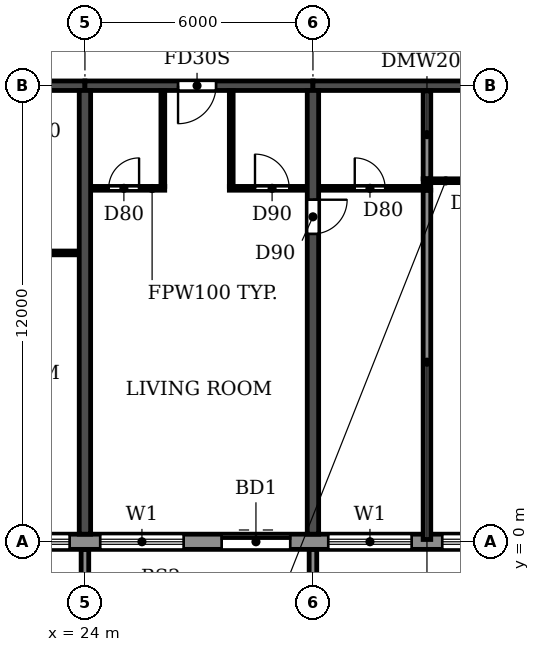
"""IFC4 building model, lengths in metres.
Left out: names, types, materials, properties, quantities, classifications, styles, units other than length and angle.
Written with IfcOpenShell. Run it as: python <this file> out.ifc"""

import sys

from ifc_helpers import new_model, si_unit, direction, frame, frame_2d, origin, place, context, subcontext, project, spatial, polyline, rectangle, outline, extrude, source, transform, mapped, element, fill, save


model = new_model("IFC4")
c1 = context("Model", 3, precision=1e-05, world=origin(), true_north=direction((0.0, 1.0)))
c2 = subcontext(c1, "Body", "Model", "MODEL_VIEW")
j1 = project(units=[si_unit("LENGTHUNIT", "METRE"), si_unit("PLANEANGLEUNIT", "RADIAN")], contexts=[c1])
p1 = place(None, origin())
s1 = spatial("IfcSite", under=j1, at=p1, CompositionType="ELEMENT")
p2 = place(p1, origin())
s2 = spatial("IfcBuilding", under=s1, at=p2, CompositionType="ELEMENT")
p3 = place(p2, frame((0.0, 0.0, 132.3)))
s3 = spatial("IfcBuildingStorey", under=s2, at=p3, CompositionType="ELEMENT", Elevation=132.3)
p4 = place(p3, frame((24.0, 0.2, 0.0), z_axis=(0.0, 0.0, 1.0), x_axis=(0.0, 1.0, 0.0)))
e1 = element("IfcWall", 1, at=p4, inside=s3, PredefinedType="SHEAR", context=c2, shape_type="SweptSolid", body=[
    extrude(rectangle(XDim=11.675, YDim=0.3, at=frame_2d((5.837, 0.0))), origin(), (0.0, 0.0, 1.0), 3.07),
])
p5 = place(p3, frame((30.0, 0.2, 0.0), z_axis=(0.0, 0.0, 1.0), x_axis=(0.0, 1.0, 0.0)))
e2 = element("IfcWall", 2, at=p5, inside=s3, PredefinedType="SHEAR", context=c2, shape_type="SweptSolid", body=[
    extrude(rectangle(XDim=11.675, YDim=0.3, at=frame_2d((5.837, 0.0))), origin(), (0.0, 0.0, 1.0), 3.07),
])
p6 = place(p5, frame((7.9, 0.0, 0.0)))
e3 = element("IfcOpeningElement", 3, at=p6, cuts=e2, PredefinedType="OPENING", context=c2, shape_type="SweptSolid", body=[
    extrude(rectangle(XDim=0.9, YDim=2.1, at=frame_2d((0.45, 1.05))), frame((0.0, 0.16, 0.0), z_axis=(0.0, -1.0, 0.0), x_axis=(1.0, 0.0, 0.0)), (0.0, 0.0, 1.0), 0.32),
])
p7 = place(p3, frame((18.0, 12.0, 0.0), z_axis=(0.0, 0.0, 1.0), x_axis=(1.0, 0.0, 0.0)))
e4 = element("IfcWall", 4, at=p7, inside=s3, PredefinedType="SHEAR", context=c2, shape_type="SweptSolid", body=[
    extrude(rectangle(XDim=6.0, YDim=0.25, at=frame_2d((3.0, 0.0))), origin(), (0.0, 0.0, 1.0), 2.47),
])
p8 = place(p7, frame((2.45, 0.0, 0.0)))
e5 = element("IfcOpeningElement", 5, at=p8, cuts=e4, PredefinedType="OPENING", context=c2, shape_type="SweptSolid", body=[
    extrude(rectangle(XDim=1.0, YDim=2.1, at=frame_2d((0.5, 1.05))), frame((0.0, 0.135, 0.0), z_axis=(0.0, -1.0, 0.0), x_axis=(1.0, 0.0, 0.0)), (0.0, 0.0, 1.0), 0.27),
])
p9 = place(p3, frame((24.0, 12.0, 0.0), z_axis=(0.0, 0.0, 1.0), x_axis=(1.0, 0.0, 0.0)))
e6 = element("IfcWall", 6, at=p9, inside=s3, PredefinedType="SHEAR", context=c2, shape_type="SweptSolid", body=[
    extrude(rectangle(XDim=6.0, YDim=0.25, at=frame_2d((3.0, 0.0))), origin(), (0.0, 0.0, 1.0), 2.47),
])
p10 = place(p9, frame((2.45, 0.0, 0.0)))
e7 = element("IfcOpeningElement", 7, at=p10, cuts=e6, PredefinedType="OPENING", context=c2, shape_type="SweptSolid", body=[
    extrude(rectangle(XDim=1.0, YDim=2.1, at=frame_2d((0.5, 1.05))), frame((0.0, 0.135, 0.0), z_axis=(0.0, -1.0, 0.0), x_axis=(1.0, 0.0, 0.0)), (0.0, 0.0, 1.0), 0.27),
])
p11 = place(p3, frame((30.0, 12.0, 0.0), z_axis=(0.0, 0.0, 1.0), x_axis=(1.0, 0.0, 0.0)))
e8 = element("IfcWall", 8, at=p11, inside=s3, PredefinedType="SHEAR", context=c2, shape_type="SweptSolid", body=[
    extrude(rectangle(XDim=6.0, YDim=0.25, at=frame_2d((3.0, 0.0))), origin(), (0.0, 0.0, 1.0), 2.47),
])
p12 = place(p3, frame((16.683, 0.0, 0.0), z_axis=(0.0, 0.0, 1.0), x_axis=(1.0, 0.0, 0.0)))
e9 = element("IfcWall", 9, at=p12, inside=s3, PredefinedType="STANDARD", context=c2, shape_type="SweptSolid", body=[
    extrude(rectangle(XDim=68.634, YDim=0.4, at=frame_2d((34.317, 0.0))), origin(), (0.0, 0.0, 1.0), 3.07),
])
p13 = place(p12, frame((1.717, 0.0, 0.9)))
e10 = element("IfcOpeningElement", 10, at=p13, cuts=e9, PredefinedType="OPENING", context=c2, shape_type="SweptSolid", body=[
    extrude(rectangle(XDim=2.2, YDim=1.5, at=frame_2d((1.1, 0.75))), frame((0.0, 0.21, 0.0), z_axis=(0.0, -1.0, 0.0), x_axis=(1.0, 0.0, 0.0)), (0.0, 0.0, 1.0), 0.42),
])
p14 = place(p12, frame((4.717, 0.0, 0.9)))
e11 = element("IfcOpeningElement", 11, at=p14, cuts=e9, PredefinedType="OPENING", context=c2, shape_type="SweptSolid", body=[
    extrude(rectangle(XDim=2.2, YDim=1.5, at=frame_2d((1.1, 0.75))), frame((0.0, 0.21, 0.0), z_axis=(0.0, -1.0, 0.0), x_axis=(1.0, 0.0, 0.0)), (0.0, 0.0, 1.0), 0.42),
])
p15 = place(p12, frame((7.717, 0.0, 0.9)))
e12 = element("IfcOpeningElement", 12, at=p15, cuts=e9, PredefinedType="OPENING", context=c2, shape_type="SweptSolid", body=[
    extrude(rectangle(XDim=2.2, YDim=1.5, at=frame_2d((1.1, 0.75))), frame((0.0, 0.21, 0.0), z_axis=(0.0, -1.0, 0.0), x_axis=(1.0, 0.0, 0.0)), (0.0, 0.0, 1.0), 0.42),
])
p16 = place(p12, frame((10.917, 0.0, 0.0)))
e13 = element("IfcOpeningElement", 13, at=p16, cuts=e9, PredefinedType="OPENING", context=c2, shape_type="SweptSolid", body=[
    extrude(rectangle(XDim=1.8, YDim=2.4, at=frame_2d((0.9, 1.2))), frame((0.0, 0.21, 0.0), z_axis=(0.0, -1.0, 0.0), x_axis=(1.0, 0.0, 0.0)), (0.0, 0.0, 1.0), 0.42),
])
p17 = place(p12, frame((13.717, 0.0, 0.9)))
e14 = element("IfcOpeningElement", 14, at=p17, cuts=e9, PredefinedType="OPENING", context=c2, shape_type="SweptSolid", body=[
    extrude(rectangle(XDim=2.2, YDim=1.5, at=frame_2d((1.1, 0.75))), frame((0.0, 0.21, 0.0), z_axis=(0.0, -1.0, 0.0), x_axis=(1.0, 0.0, 0.0)), (0.0, 0.0, 1.0), 0.42),
])
p18 = place(p12, frame((16.717, 0.0, 0.9)))
e15 = element("IfcOpeningElement", 15, at=p18, cuts=e9, PredefinedType="OPENING", context=c2, shape_type="SweptSolid", body=[
    extrude(rectangle(XDim=2.2, YDim=1.5, at=frame_2d((1.1, 0.75))), frame((0.0, 0.21, 0.0), z_axis=(0.0, -1.0, 0.0), x_axis=(1.0, 0.0, 0.0)), (0.0, 0.0, 1.0), 0.42),
])
p19 = place(p12, frame((19.917, 0.0, 0.0)))
e16 = element("IfcOpeningElement", 16, at=p19, cuts=e9, PredefinedType="OPENING", context=c2, shape_type="SweptSolid", body=[
    extrude(rectangle(XDim=1.8, YDim=2.4, at=frame_2d((0.9, 1.2))), frame((0.0, 0.21, 0.0), z_axis=(0.0, -1.0, 0.0), x_axis=(1.0, 0.0, 0.0)), (0.0, 0.0, 1.0), 0.42),
])
p20 = place(p12, frame((22.717, 0.0, 0.9)))
e17 = element("IfcOpeningElement", 17, at=p20, cuts=e9, PredefinedType="OPENING", context=c2, shape_type="SweptSolid", body=[
    extrude(rectangle(XDim=2.2, YDim=1.5, at=frame_2d((1.1, 0.75))), frame((0.0, 0.21, 0.0), z_axis=(0.0, -1.0, 0.0), x_axis=(1.0, 0.0, 0.0)), (0.0, 0.0, 1.0), 0.42),
])
p21 = place(p12, frame((25.717, 0.0, 0.9)))
e18 = element("IfcOpeningElement", 18, at=p21, cuts=e9, PredefinedType="OPENING", context=c2, shape_type="SweptSolid", body=[
    extrude(rectangle(XDim=2.2, YDim=1.5, at=frame_2d((1.1, 0.75))), frame((0.0, 0.21, 0.0), z_axis=(0.0, -1.0, 0.0), x_axis=(1.0, 0.0, 0.0)), (0.0, 0.0, 1.0), 0.42),
])
p22 = place(p12, frame((28.717, 0.0, 0.9)))
e19 = element("IfcOpeningElement", 19, at=p22, cuts=e9, PredefinedType="OPENING", context=c2, shape_type="SweptSolid", body=[
    extrude(rectangle(XDim=2.2, YDim=1.5, at=frame_2d((1.1, 0.75))), frame((0.0, 0.21, 0.0), z_axis=(0.0, -1.0, 0.0), x_axis=(1.0, 0.0, 0.0)), (0.0, 0.0, 1.0), 0.42),
])
p23 = place(p12, frame((31.917, 0.0, 0.0)))
e20 = element("IfcOpeningElement", 20, at=p23, cuts=e9, PredefinedType="OPENING", context=c2, shape_type="SweptSolid", body=[
    extrude(rectangle(XDim=1.8, YDim=2.4, at=frame_2d((0.9, 1.2))), frame((0.0, 0.21, 0.0), z_axis=(0.0, -1.0, 0.0), x_axis=(1.0, 0.0, 0.0)), (0.0, 0.0, 1.0), 0.42),
])
p24 = place(p12, frame((34.717, 0.0, 0.9)))
e21 = element("IfcOpeningElement", 21, at=p24, cuts=e9, PredefinedType="OPENING", context=c2, shape_type="SweptSolid", body=[
    extrude(rectangle(XDim=2.2, YDim=1.5, at=frame_2d((1.1, 0.75))), frame((0.0, 0.21, 0.0), z_axis=(0.0, -1.0, 0.0), x_axis=(1.0, 0.0, 0.0)), (0.0, 0.0, 1.0), 0.42),
])
p25 = place(p12, frame((37.717, 0.0, 0.9)))
e22 = element("IfcOpeningElement", 22, at=p25, cuts=e9, PredefinedType="OPENING", context=c2, shape_type="SweptSolid", body=[
    extrude(rectangle(XDim=2.2, YDim=1.5, at=frame_2d((1.1, 0.75))), frame((0.0, 0.21, 0.0), z_axis=(0.0, -1.0, 0.0), x_axis=(1.0, 0.0, 0.0)), (0.0, 0.0, 1.0), 0.42),
])
p26 = place(p12, frame((40.717, 0.0, 0.9)))
e23 = element("IfcOpeningElement", 23, at=p26, cuts=e9, PredefinedType="OPENING", context=c2, shape_type="SweptSolid", body=[
    extrude(rectangle(XDim=2.2, YDim=1.5, at=frame_2d((1.1, 0.75))), frame((0.0, 0.21, 0.0), z_axis=(0.0, -1.0, 0.0), x_axis=(1.0, 0.0, 0.0)), (0.0, 0.0, 1.0), 0.42),
])
p27 = place(p12, frame((43.717, 0.0, 0.9)))
e24 = element("IfcOpeningElement", 24, at=p27, cuts=e9, PredefinedType="OPENING", context=c2, shape_type="SweptSolid", body=[
    extrude(rectangle(XDim=2.2, YDim=1.5, at=frame_2d((1.1, 0.75))), frame((0.0, 0.21, 0.0), z_axis=(0.0, -1.0, 0.0), x_axis=(1.0, 0.0, 0.0)), (0.0, 0.0, 1.0), 0.42),
])
p28 = place(p12, frame((46.917, 0.0, 0.0)))
e25 = element("IfcOpeningElement", 25, at=p28, cuts=e9, PredefinedType="OPENING", context=c2, shape_type="SweptSolid", body=[
    extrude(rectangle(XDim=1.8, YDim=2.4, at=frame_2d((0.9, 1.2))), frame((0.0, 0.21, 0.0), z_axis=(0.0, -1.0, 0.0), x_axis=(1.0, 0.0, 0.0)), (0.0, 0.0, 1.0), 0.42),
])
p29 = place(p12, frame((49.717, 0.0, 0.9)))
e26 = element("IfcOpeningElement", 26, at=p29, cuts=e9, PredefinedType="OPENING", context=c2, shape_type="SweptSolid", body=[
    extrude(rectangle(XDim=2.2, YDim=1.5, at=frame_2d((1.1, 0.75))), frame((0.0, 0.21, 0.0), z_axis=(0.0, -1.0, 0.0), x_axis=(1.0, 0.0, 0.0)), (0.0, 0.0, 1.0), 0.42),
])
p30 = place(p12, frame((52.717, 0.0, 0.9)))
e27 = element("IfcOpeningElement", 27, at=p30, cuts=e9, PredefinedType="OPENING", context=c2, shape_type="SweptSolid", body=[
    extrude(rectangle(XDim=2.2, YDim=1.5, at=frame_2d((1.1, 0.75))), frame((0.0, 0.21, 0.0), z_axis=(0.0, -1.0, 0.0), x_axis=(1.0, 0.0, 0.0)), (0.0, 0.0, 1.0), 0.42),
])
p31 = place(p12, frame((55.717, 0.0, 0.9)))
e28 = element("IfcOpeningElement", 28, at=p31, cuts=e9, PredefinedType="OPENING", context=c2, shape_type="SweptSolid", body=[
    extrude(rectangle(XDim=2.2, YDim=1.5, at=frame_2d((1.1, 0.75))), frame((0.0, 0.21, 0.0), z_axis=(0.0, -1.0, 0.0), x_axis=(1.0, 0.0, 0.0)), (0.0, 0.0, 1.0), 0.42),
])
p32 = place(p12, frame((58.917, 0.0, 0.0)))
e29 = element("IfcOpeningElement", 29, at=p32, cuts=e9, PredefinedType="OPENING", context=c2, shape_type="SweptSolid", body=[
    extrude(rectangle(XDim=1.8, YDim=2.4, at=frame_2d((0.9, 1.2))), frame((0.0, 0.21, 0.0), z_axis=(0.0, -1.0, 0.0), x_axis=(1.0, 0.0, 0.0)), (0.0, 0.0, 1.0), 0.42),
])
p33 = place(p12, frame((61.717, 0.0, 0.9)))
e30 = element("IfcOpeningElement", 30, at=p33, cuts=e9, PredefinedType="OPENING", context=c2, shape_type="SweptSolid", body=[
    extrude(rectangle(XDim=2.2, YDim=1.5, at=frame_2d((1.1, 0.75))), frame((0.0, 0.21, 0.0), z_axis=(0.0, -1.0, 0.0), x_axis=(1.0, 0.0, 0.0)), (0.0, 0.0, 1.0), 0.42),
])
p34 = place(p12, frame((64.717, 0.0, 0.9)))
e31 = element("IfcOpeningElement", 31, at=p34, cuts=e9, PredefinedType="OPENING", context=c2, shape_type="SweptSolid", body=[
    extrude(rectangle(XDim=2.2, YDim=1.5, at=frame_2d((1.1, 0.75))), frame((0.0, 0.21, 0.0), z_axis=(0.0, -1.0, 0.0), x_axis=(1.0, 0.0, 0.0)), (0.0, 0.0, 1.0), 0.42),
])
m1 = source(origin(), c2, "Body", "SweptSolid", [
    extrude(outline(polyline([(0.0, 0.0), (0.2, 0.0), (0.2, 1.65), (0.0, 1.65), (0.0, 0.0)])), origin(), (0.0, 0.0, 1.0), 3.1),
])
for number, where in (
    (32, (23.9, -1.85, 0.0)),
    (33, (29.9, -1.85, 0.0)),
):
    element("IfcWall", number, at=place(p3, frame(where)), inside=s3, PredefinedType="STANDARD", context=c2, shape_type="MappedRepresentation", body=[
        mapped(m1, transform((0.0, 0.0, 0.0))),
    ])
p35 = place(p3, frame((33.0, 0.06, 0.0), z_axis=(0.0, 0.0, 1.0), x_axis=(0.0, 1.0, 0.0)))
e34 = element("IfcWall", 34, at=p35, inside=s3, PredefinedType="PARTITIONING", context=c2, shape_type="SweptSolid", body=[
    extrude(rectangle(XDim=9.19, YDim=0.2, at=frame_2d((4.595, 0.0))), origin(), (0.0, 0.0, 1.0), 3.07),
])
p36 = place(p3, frame((33.0, 9.55, 0.0), z_axis=(0.0, 0.0, 1.0), x_axis=(0.0, 1.0, 0.0)))
e35 = element("IfcWall", 35, at=p36, inside=s3, PredefinedType="PARTITIONING", context=c2, shape_type="SweptSolid", body=[
    extrude(rectangle(XDim=2.315, YDim=0.2, at=frame_2d((1.157, 0.0))), origin(), (0.0, 0.0, 1.0), 3.07),
])
p37 = place(p3, frame((21.8, 7.6, 0.0), z_axis=(0.0, 0.0, 1.0), x_axis=(1.0, 0.0, 0.0)))
e36 = element("IfcWall", 36, at=p37, inside=s3, PredefinedType="PARTITIONING", context=c2, shape_type="SweptSolid", body=[
    extrude(rectangle(XDim=2.04, YDim=0.1, at=frame_2d((1.02, 0.0))), origin(), (0.0, 0.0, 1.0), 3.07),
])
p38 = place(p3, frame((24.16, 9.3, 0.0), z_axis=(0.0, 0.0, 1.0), x_axis=(1.0, 0.0, 0.0)))
e37 = element("IfcWall", 37, at=p38, inside=s3, PredefinedType="PARTITIONING", context=c2, shape_type="SweptSolid", body=[
    extrude(rectangle(XDim=1.94, YDim=0.1, at=frame_2d((0.97, 0.0))), origin(), (0.0, 0.0, 1.0), 3.07),
])
p39 = place(p38, frame((0.465, 0.0, 0.0)))
e38 = element("IfcOpeningElement", 38, at=p39, cuts=e37, PredefinedType="OPENING", context=c2, shape_type="SweptSolid", body=[
    extrude(rectangle(XDim=0.8, YDim=2.1, at=frame_2d((0.4, 1.05))), frame((0.0, 0.06, 0.0), z_axis=(0.0, -1.0, 0.0), x_axis=(1.0, 0.0, 0.0)), (0.0, 0.0, 1.0), 0.12),
])
p40 = place(p3, frame((27.8, 9.3, 0.0), z_axis=(0.0, 0.0, 1.0), x_axis=(1.0, 0.0, 0.0)))
e39 = element("IfcWall", 39, at=p40, inside=s3, PredefinedType="PARTITIONING", context=c2, shape_type="SweptSolid", body=[
    extrude(rectangle(XDim=2.04, YDim=0.1, at=frame_2d((1.02, 0.0))), origin(), (0.0, 0.0, 1.0), 3.07),
])
p41 = place(p40, frame((0.675, 0.0, 0.0)))
e40 = element("IfcOpeningElement", 40, at=p41, cuts=e39, PredefinedType="OPENING", context=c2, shape_type="SweptSolid", body=[
    extrude(rectangle(XDim=0.9, YDim=2.1, at=frame_2d((0.45, 1.05))), frame((0.0, 0.06, 0.0), z_axis=(0.0, -1.0, 0.0), x_axis=(1.0, 0.0, 0.0)), (0.0, 0.0, 1.0), 0.12),
])
p42 = place(p3, frame((30.16, 9.3, 0.0), z_axis=(0.0, 0.0, 1.0), x_axis=(1.0, 0.0, 0.0)))
e41 = element("IfcWall", 41, at=p42, inside=s3, PredefinedType="PARTITIONING", context=c2, shape_type="SweptSolid", body=[
    extrude(rectangle(XDim=2.94, YDim=0.1, at=frame_2d((1.47, 0.0))), origin(), (0.0, 0.0, 1.0), 3.07),
])
p43 = place(p42, frame((0.94, 0.0, 0.0)))
e42 = element("IfcOpeningElement", 42, at=p43, cuts=e41, PredefinedType="OPENING", context=c2, shape_type="SweptSolid", body=[
    extrude(rectangle(XDim=0.8, YDim=2.1, at=frame_2d((0.4, 1.05))), frame((0.0, 0.06, 0.0), z_axis=(0.0, -1.0, 0.0), x_axis=(1.0, 0.0, 0.0)), (0.0, 0.0, 1.0), 0.12),
])
p44 = place(p3, frame((32.9, 9.5, 0.0), z_axis=(0.0, 0.0, 1.0), x_axis=(1.0, 0.0, 0.0)))
e43 = element("IfcWall", 43, at=p44, inside=s3, PredefinedType="PARTITIONING", context=c2, shape_type="SweptSolid", body=[
    extrude(rectangle(XDim=2.94, YDim=0.1, at=frame_2d((1.47, 0.0))), origin(), (0.0, 0.0, 1.0), 3.07),
])
p45 = place(p44, frame((1.2, 0.0, 0.0)))
e44 = element("IfcOpeningElement", 44, at=p45, cuts=e43, PredefinedType="OPENING", context=c2, shape_type="SweptSolid", body=[
    extrude(rectangle(XDim=0.8, YDim=2.1, at=frame_2d((0.4, 1.05))), frame((0.0, 0.06, 0.0), z_axis=(0.0, -1.0, 0.0), x_axis=(1.0, 0.0, 0.0)), (0.0, 0.0, 1.0), 0.12),
])
for number, where, z_axis, x_axis in (
    (45, (26.05, 9.35, 0.0), (0.0, 0.0, 1.0), (0.0, 1.0, 0.0)),
    (46, (27.85, 9.35, 0.0), (0.0, 0.0, 1.0), (0.0, 1.0, 0.0)),
):
    element("IfcWall", number, at=place(p3, frame(where, z_axis=z_axis, x_axis=x_axis)), inside=s3, PredefinedType="PARTITIONING", context=c2, shape_type="SweptSolid", body=[
        extrude(rectangle(XDim=2.515, YDim=0.1, at=frame_2d((1.257, 0.0))), origin(), (0.0, 0.0, 1.0), 3.07),
    ])
p46 = place(p14, origin())
e47 = element("IfcWindow", 47, at=p46, inside=s3, PartitioningType="DOUBLE_PANEL_HORIZONTAL", PredefinedType="WINDOW", context=c2, shape_type="SweptSolid", body=[
    extrude(rectangle(XDim=2.2, YDim=1.5, at=frame_2d((1.1, 0.75))), frame((0.0, 0.03, 0.0), z_axis=(0.0, -1.0, 0.0), x_axis=(1.0, 0.0, 0.0)), (0.0, 0.0, 1.0), 0.06),
])
fill(e11, e47)
p47 = place(p15, origin())
e48 = element("IfcWindow", 48, at=p47, inside=s3, PartitioningType="DOUBLE_PANEL_HORIZONTAL", PredefinedType="WINDOW", context=c2, shape_type="SweptSolid", body=[
    extrude(rectangle(XDim=2.2, YDim=1.5, at=frame_2d((1.1, 0.75))), frame((0.0, 0.03, 0.0), z_axis=(0.0, -1.0, 0.0), x_axis=(1.0, 0.0, 0.0)), (0.0, 0.0, 1.0), 0.06),
])
fill(e12, e48)
p48 = place(p16, origin())
e49 = element("IfcDoor", 49, at=p48, inside=s3, OperationType="DOUBLE_DOOR_SLIDING", PredefinedType="DOOR", context=c2, shape_type="SweptSolid", body=[
    extrude(rectangle(XDim=1.8, YDim=2.4, at=frame_2d((0.9, 1.2))), frame((0.0, 0.025, 0.0), z_axis=(0.0, -1.0, 0.0), x_axis=(1.0, 0.0, 0.0)), (0.0, 0.0, 1.0), 0.05),
])
fill(e13, e49)
p49 = place(p17, origin())
e50 = element("IfcWindow", 50, at=p49, inside=s3, PartitioningType="DOUBLE_PANEL_HORIZONTAL", PredefinedType="WINDOW", context=c2, shape_type="SweptSolid", body=[
    extrude(rectangle(XDim=2.2, YDim=1.5, at=frame_2d((1.1, 0.75))), frame((0.0, 0.03, 0.0), z_axis=(0.0, -1.0, 0.0), x_axis=(1.0, 0.0, 0.0)), (0.0, 0.0, 1.0), 0.06),
])
fill(e14, e50)
p50 = place(p18, origin())
e51 = element("IfcWindow", 51, at=p50, inside=s3, PartitioningType="DOUBLE_PANEL_HORIZONTAL", PredefinedType="WINDOW", context=c2, shape_type="SweptSolid", body=[
    extrude(rectangle(XDim=2.2, YDim=1.5, at=frame_2d((1.1, 0.75))), frame((0.0, 0.03, 0.0), z_axis=(0.0, -1.0, 0.0), x_axis=(1.0, 0.0, 0.0)), (0.0, 0.0, 1.0), 0.06),
])
fill(e15, e51)
p51 = place(p43, origin())
e52 = element("IfcDoor", 52, at=p51, inside=s3, OperationType="SINGLE_SWING_LEFT", PredefinedType="DOOR", context=c2, shape_type="SweptSolid", body=[
    extrude(rectangle(XDim=0.8, YDim=2.1, at=frame_2d((0.4, 1.05))), frame((0.0, 0.025, 0.0), z_axis=(0.0, -1.0, 0.0), x_axis=(1.0, 0.0, 0.0)), (0.0, 0.0, 1.0), 0.05),
])
fill(e42, e52)
p52 = place(p39, origin())
e53 = element("IfcDoor", 53, at=p52, inside=s3, OperationType="SINGLE_SWING_RIGHT", PredefinedType="DOOR", context=c2, shape_type="SweptSolid", body=[
    extrude(rectangle(XDim=0.8, YDim=2.1, at=frame_2d((0.4, 1.05))), frame((0.0, 0.025, 0.0), z_axis=(0.0, -1.0, 0.0), x_axis=(1.0, 0.0, 0.0)), (0.0, 0.0, 1.0), 0.05),
])
fill(e38, e53)
p53 = place(p10, frame((1.0, 0.0, 0.0), z_axis=(0.0, 0.0, 1.0), x_axis=(-1.0, 0.0, 0.0)))
e54 = element("IfcDoor", 54, at=p53, inside=s3, OperationType="SINGLE_SWING_RIGHT", PredefinedType="DOOR", context=c2, shape_type="SweptSolid", body=[
    extrude(rectangle(XDim=1.0, YDim=2.1, at=frame_2d((0.5, 1.05))), frame((0.0, 0.025, 0.0), z_axis=(0.0, -1.0, 0.0), x_axis=(1.0, 0.0, 0.0)), (0.0, 0.0, 1.0), 0.05),
])
fill(e7, e54)
p54 = place(p41, origin())
e55 = element("IfcDoor", 55, at=p54, inside=s3, OperationType="SINGLE_SWING_LEFT", PredefinedType="DOOR", context=c2, shape_type="SweptSolid", body=[
    extrude(rectangle(XDim=0.9, YDim=2.1, at=frame_2d((0.45, 1.05))), frame((0.0, 0.025, 0.0), z_axis=(0.0, -1.0, 0.0), x_axis=(1.0, 0.0, 0.0)), (0.0, 0.0, 1.0), 0.05),
])
fill(e40, e55)
p55 = place(p6, frame((0.9, 0.0, 0.0), z_axis=(0.0, 0.0, 1.0), x_axis=(-1.0, 0.0, 0.0)))
e56 = element("IfcDoor", 56, at=p55, inside=s3, OperationType="SINGLE_SWING_LEFT", PredefinedType="DOOR", context=c2, shape_type="SweptSolid", body=[
    extrude(rectangle(XDim=0.9, YDim=2.1, at=frame_2d((0.45, 1.05))), frame((0.0, 0.025, 0.0), z_axis=(0.0, -1.0, 0.0), x_axis=(1.0, 0.0, 0.0)), (0.0, 0.0, 1.0), 0.05),
])
fill(e3, e56)
save(model, sys.argv[1])
